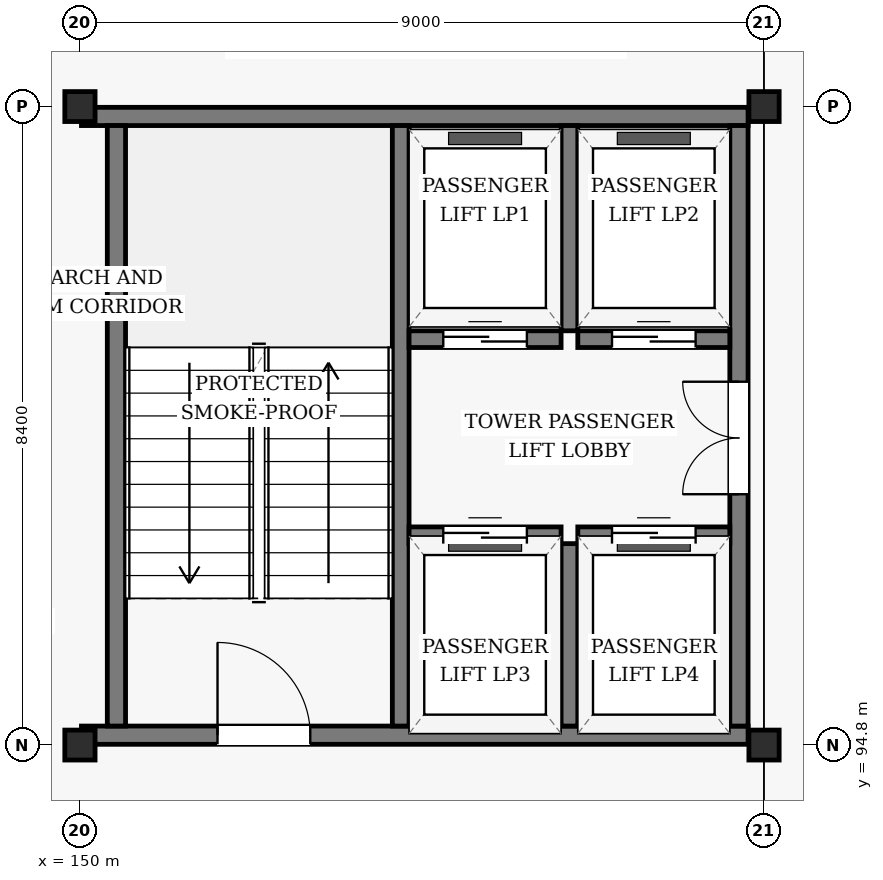
"""IFC4 building model, lengths in metres.
Left out: names, types, materials, properties, quantities, classifications, styles, units other than length and angle.
Written with IfcOpenShell. Run it as: python <this file> out.ifc"""

import sys

from ifc_helpers import new_model, si_unit, direction, frame, frame_2d, origin, origin_2d, place, context, subcontext, project, spatial, rectangle, i_section, extrude, element, fill, save


model = new_model("IFC4")
c1 = context("Model", 3, precision=1e-05, world=origin(), true_north=direction((0.0, 1.0)))
c2 = subcontext(c1, "Body", "Model", "MODEL_VIEW")
j1 = project(units=[si_unit("LENGTHUNIT", "METRE"), si_unit("PLANEANGLEUNIT", "RADIAN")], contexts=[c1])
p1 = place(None, origin())
s1 = spatial("IfcSite", under=j1, at=p1, CompositionType="ELEMENT")
p2 = place(p1, origin())
s2 = spatial("IfcBuilding", under=s1, at=p2, CompositionType="ELEMENT")
p3 = place(p2, frame((0.0, 0.0, 31.8)))
s3 = spatial("IfcBuildingStorey", under=s2, at=p3, CompositionType="ELEMENT", Elevation=31.8)
for number, where, z_axis, x_axis in (
    (1, (150.0, 94.8, 0.0), (0.0, 0.0, 1.0), (1.0, 0.0, 0.0)),
    (2, (150.0, 103.2, 0.0), (0.0, 0.0, 1.0), (1.0, 0.0, 0.0)),
    (3, (159.0, 94.8, 0.0), (0.0, 0.0, 1.0), (1.0, 0.0, 0.0)),
    (4, (159.0, 103.2, 0.0), (0.0, 0.0, 1.0), (1.0, 0.0, 0.0)),
):
    element("IfcColumn", number, at=place(p3, frame(where, z_axis=z_axis, x_axis=x_axis)), inside=s3, PredefinedType="COLUMN", context=c2, shape_type="SweptSolid", body=[
        extrude(i_section(OverallWidth=0.398, OverallDepth=0.394, WebThickness=0.011, FlangeThickness=0.018, FilletRadius=0.022, at=origin_2d()), origin(), (0.0, 0.0, 1.0), 3.6),
    ])
p4 = place(p3, frame((150.02, 94.93, 0.0), z_axis=(0.0, 0.0, 1.0), x_axis=(1.0, 0.0, 0.0)))
e5 = element("IfcWall", 5, at=p4, inside=s3, PredefinedType="SHEAR", context=c2, shape_type="SweptSolid", body=[
    extrude(rectangle(XDim=8.77, YDim=0.24, at=frame_2d((4.385, 0.0))), origin(), (0.0, 0.0, 1.0), 3.295),
])
p5 = place(p4, frame((1.79, 0.0, 0.0)))
e6 = element("IfcOpeningElement", 6, at=p5, cuts=e5, PredefinedType="OPENING", context=c2, shape_type="SweptSolid", body=[
    extrude(rectangle(XDim=1.22, YDim=2.18, at=frame_2d((0.61, 1.09))), frame((0.0, 0.13, 0.0), z_axis=(0.0, -1.0, 0.0), x_axis=(1.0, 0.0, 0.0)), (0.0, 0.0, 1.0), 0.26),
])
p6 = place(p3, frame((150.02, 103.07, 0.0), z_axis=(0.0, 0.0, 1.0), x_axis=(1.0, 0.0, 0.0)))
e7 = element("IfcWall", 7, at=p6, inside=s3, PredefinedType="SHEAR", context=c2, shape_type="SweptSolid", body=[
    extrude(rectangle(XDim=8.77, YDim=0.24, at=frame_2d((4.385, 0.0))), origin(), (0.0, 0.0, 1.0), 3.295),
])
p7 = place(p3, frame((150.48, 95.05, 0.0), z_axis=(0.0, 0.0, 1.0), x_axis=(0.0, 1.0, 0.0)))
e8 = element("IfcWall", 8, at=p7, inside=s3, PredefinedType="SHEAR", context=c2, shape_type="SweptSolid", body=[
    extrude(rectangle(XDim=7.9, YDim=0.24, at=frame_2d((3.95, 0.0))), origin(), (0.0, 0.0, 1.0), 3.295),
])
p8 = place(p3, frame((154.22, 95.05, 0.0), z_axis=(0.0, 0.0, 1.0), x_axis=(0.0, 1.0, 0.0)))
e9 = element("IfcWall", 9, at=p8, inside=s3, PredefinedType="SHEAR", context=c2, shape_type="SweptSolid", body=[
    extrude(rectangle(XDim=7.9, YDim=0.22, at=frame_2d((3.95, 0.0))), origin(), (0.0, 0.0, 1.0), 3.295),
])
p9 = place(p3, frame((158.67, 95.05, 0.0), z_axis=(0.0, 0.0, 1.0), x_axis=(0.0, 1.0, 0.0)))
e10 = element("IfcWall", 10, at=p9, inside=s3, PredefinedType="SHEAR", context=c2, shape_type="SweptSolid", body=[
    extrude(rectangle(XDim=7.9, YDim=0.24, at=frame_2d((3.95, 0.0))), origin(), (0.0, 0.0, 1.0), 3.295),
])
p10 = place(p9, frame((3.05, 0.0, 0.0)))
e11 = element("IfcOpeningElement", 11, at=p10, cuts=e10, PredefinedType="OPENING", context=c2, shape_type="SweptSolid", body=[
    extrude(rectangle(XDim=1.48, YDim=2.22, at=frame_2d((0.74, 1.11))), frame((0.0, 0.13, 0.0), z_axis=(0.0, -1.0, 0.0), x_axis=(1.0, 0.0, 0.0)), (0.0, 0.0, 1.0), 0.26),
])
p11 = place(p3, frame((156.44, 100.25, 0.0), z_axis=(0.0, 0.0, 1.0), x_axis=(0.0, 1.0, 0.0)))
e12 = element("IfcWall", 12, at=p11, inside=s3, PredefinedType="SHEAR", context=c2, shape_type="SweptSolid", body=[
    extrude(rectangle(XDim=2.7, YDim=0.22, at=frame_2d((1.35, 0.0))), origin(), (0.0, 0.0, 1.0), 3.295),
])
p12 = place(p3, frame((154.33, 100.14, 0.0), z_axis=(0.0, 0.0, 1.0), x_axis=(1.0, 0.0, 0.0)))
e13 = element("IfcWall", 13, at=p12, inside=s3, PredefinedType="SHEAR", context=c2, shape_type="SweptSolid", body=[
    extrude(rectangle(XDim=2.0, YDim=0.22, at=frame_2d((1.0, 0.0))), origin(), (0.0, 0.0, 1.0), 3.295),
])
p13 = place(p12, frame((0.45, 0.0, 0.0)))
e14 = element("IfcOpeningElement", 14, at=p13, cuts=e13, PredefinedType="OPENING", context=c2, shape_type="SweptSolid", body=[
    extrude(rectangle(XDim=1.1, YDim=2.15, at=frame_2d((0.55, 1.075))), frame((0.0, 0.12, 0.0), z_axis=(0.0, -1.0, 0.0), x_axis=(1.0, 0.0, 0.0)), (0.0, 0.0, 1.0), 0.24),
])
p14 = place(p3, frame((156.55, 100.14, 0.0), z_axis=(0.0, 0.0, 1.0), x_axis=(1.0, 0.0, 0.0)))
e15 = element("IfcWall", 15, at=p14, inside=s3, PredefinedType="SHEAR", context=c2, shape_type="SweptSolid", body=[
    extrude(rectangle(XDim=2.0, YDim=0.22, at=frame_2d((1.0, 0.0))), origin(), (0.0, 0.0, 1.0), 3.295),
])
p15 = place(p14, frame((0.45, 0.0, 0.0)))
e16 = element("IfcOpeningElement", 16, at=p15, cuts=e15, PredefinedType="OPENING", context=c2, shape_type="SweptSolid", body=[
    extrude(rectangle(XDim=1.1, YDim=2.15, at=frame_2d((0.55, 1.075))), frame((0.0, 0.12, 0.0), z_axis=(0.0, -1.0, 0.0), x_axis=(1.0, 0.0, 0.0)), (0.0, 0.0, 1.0), 0.24),
])
p16 = place(p3, frame((156.44, 95.05, 0.0), z_axis=(0.0, 0.0, 1.0), x_axis=(0.0, 1.0, 0.0)))
e17 = element("IfcWall", 17, at=p16, inside=s3, PredefinedType="SHEAR", context=c2, shape_type="SweptSolid", body=[
    extrude(rectangle(XDim=2.4, YDim=0.22, at=frame_2d((1.2, 0.0))), origin(), (0.0, 0.0, 1.0), 3.295),
])
p17 = place(p3, frame((154.33, 97.56, 0.0), z_axis=(0.0, 0.0, 1.0), x_axis=(1.0, 0.0, 0.0)))
e18 = element("IfcWall", 18, at=p17, inside=s3, PredefinedType="SHEAR", context=c2, shape_type="SweptSolid", body=[
    extrude(rectangle(XDim=2.0, YDim=0.22, at=frame_2d((1.0, 0.0))), origin(), (0.0, 0.0, 1.0), 3.295),
])
p18 = place(p17, frame((0.45, 0.0, 0.0)))
e19 = element("IfcOpeningElement", 19, at=p18, cuts=e18, PredefinedType="OPENING", context=c2, shape_type="SweptSolid", body=[
    extrude(rectangle(XDim=1.1, YDim=2.15, at=frame_2d((0.55, 1.075))), frame((0.0, 0.12, 0.0), z_axis=(0.0, -1.0, 0.0), x_axis=(1.0, 0.0, 0.0)), (0.0, 0.0, 1.0), 0.24),
])
p19 = place(p3, frame((156.55, 97.56, 0.0), z_axis=(0.0, 0.0, 1.0), x_axis=(1.0, 0.0, 0.0)))
e20 = element("IfcWall", 20, at=p19, inside=s3, PredefinedType="SHEAR", context=c2, shape_type="SweptSolid", body=[
    extrude(rectangle(XDim=2.0, YDim=0.22, at=frame_2d((1.0, 0.0))), origin(), (0.0, 0.0, 1.0), 3.295),
])
p20 = place(p19, frame((0.45, 0.0, 0.0)))
e21 = element("IfcOpeningElement", 21, at=p20, cuts=e20, PredefinedType="OPENING", context=c2, shape_type="SweptSolid", body=[
    extrude(rectangle(XDim=1.1, YDim=2.15, at=frame_2d((0.55, 1.075))), frame((0.0, 0.12, 0.0), z_axis=(0.0, -1.0, 0.0), x_axis=(1.0, 0.0, 0.0)), (0.0, 0.0, 1.0), 0.24),
])
p21 = place(p5, origin())
e22 = element("IfcDoor", 22, at=p21, inside=s3, OperationType="SINGLE_SWING_LEFT", PredefinedType="DOOR", context=c2, shape_type="SweptSolid", body=[
    extrude(rectangle(XDim=1.22, YDim=2.18, at=frame_2d((0.61, 1.09))), frame((0.0, 0.025, 0.0), z_axis=(0.0, -1.0, 0.0), x_axis=(1.0, 0.0, 0.0)), (0.0, 0.0, 1.0), 0.05),
])
fill(e6, e22)
p22 = place(p10, origin())
e23 = element("IfcDoor", 23, at=p22, inside=s3, OperationType="DOUBLE_DOOR_SINGLE_SWING", PredefinedType="DOOR", context=c2, shape_type="SweptSolid", body=[
    extrude(rectangle(XDim=1.48, YDim=2.22, at=frame_2d((0.74, 1.11))), frame((0.0, 0.025, 0.0), z_axis=(0.0, -1.0, 0.0), x_axis=(1.0, 0.0, 0.0)), (0.0, 0.0, 1.0), 0.05),
])
fill(e11, e23)
p23 = place(p13, origin())
e24 = element("IfcDoor", 24, at=p23, inside=s3, OperationType="SLIDING_TO_LEFT", PredefinedType="DOOR", context=c2, shape_type="SweptSolid", body=[
    extrude(rectangle(XDim=1.1, YDim=2.15, at=frame_2d((0.55, 1.075))), frame((0.0, 0.025, 0.0), z_axis=(0.0, -1.0, 0.0), x_axis=(1.0, 0.0, 0.0)), (0.0, 0.0, 1.0), 0.05),
])
fill(e14, e24)
p24 = place(p15, origin())
e25 = element("IfcDoor", 25, at=p24, inside=s3, OperationType="SLIDING_TO_LEFT", PredefinedType="DOOR", context=c2, shape_type="SweptSolid", body=[
    extrude(rectangle(XDim=1.1, YDim=2.15, at=frame_2d((0.55, 1.075))), frame((0.0, 0.025, 0.0), z_axis=(0.0, -1.0, 0.0), x_axis=(1.0, 0.0, 0.0)), (0.0, 0.0, 1.0), 0.05),
])
fill(e16, e25)
p25 = place(p18, origin())
e26 = element("IfcDoor", 26, at=p25, inside=s3, OperationType="SLIDING_TO_LEFT", PredefinedType="DOOR", context=c2, shape_type="SweptSolid", body=[
    extrude(rectangle(XDim=1.1, YDim=2.15, at=frame_2d((0.55, 1.075))), frame((0.0, 0.025, 0.0), z_axis=(0.0, -1.0, 0.0), x_axis=(1.0, 0.0, 0.0)), (0.0, 0.0, 1.0), 0.05),
])
fill(e19, e26)
p26 = place(p20, origin())
e27 = element("IfcDoor", 27, at=p26, inside=s3, OperationType="SLIDING_TO_LEFT", PredefinedType="DOOR", context=c2, shape_type="SweptSolid", body=[
    extrude(rectangle(XDim=1.1, YDim=2.15, at=frame_2d((0.55, 1.075))), frame((0.0, 0.025, 0.0), z_axis=(0.0, -1.0, 0.0), x_axis=(1.0, 0.0, 0.0)), (0.0, 0.0, 1.0), 0.05),
])
fill(e21, e27)
save(model, sys.argv[1])
